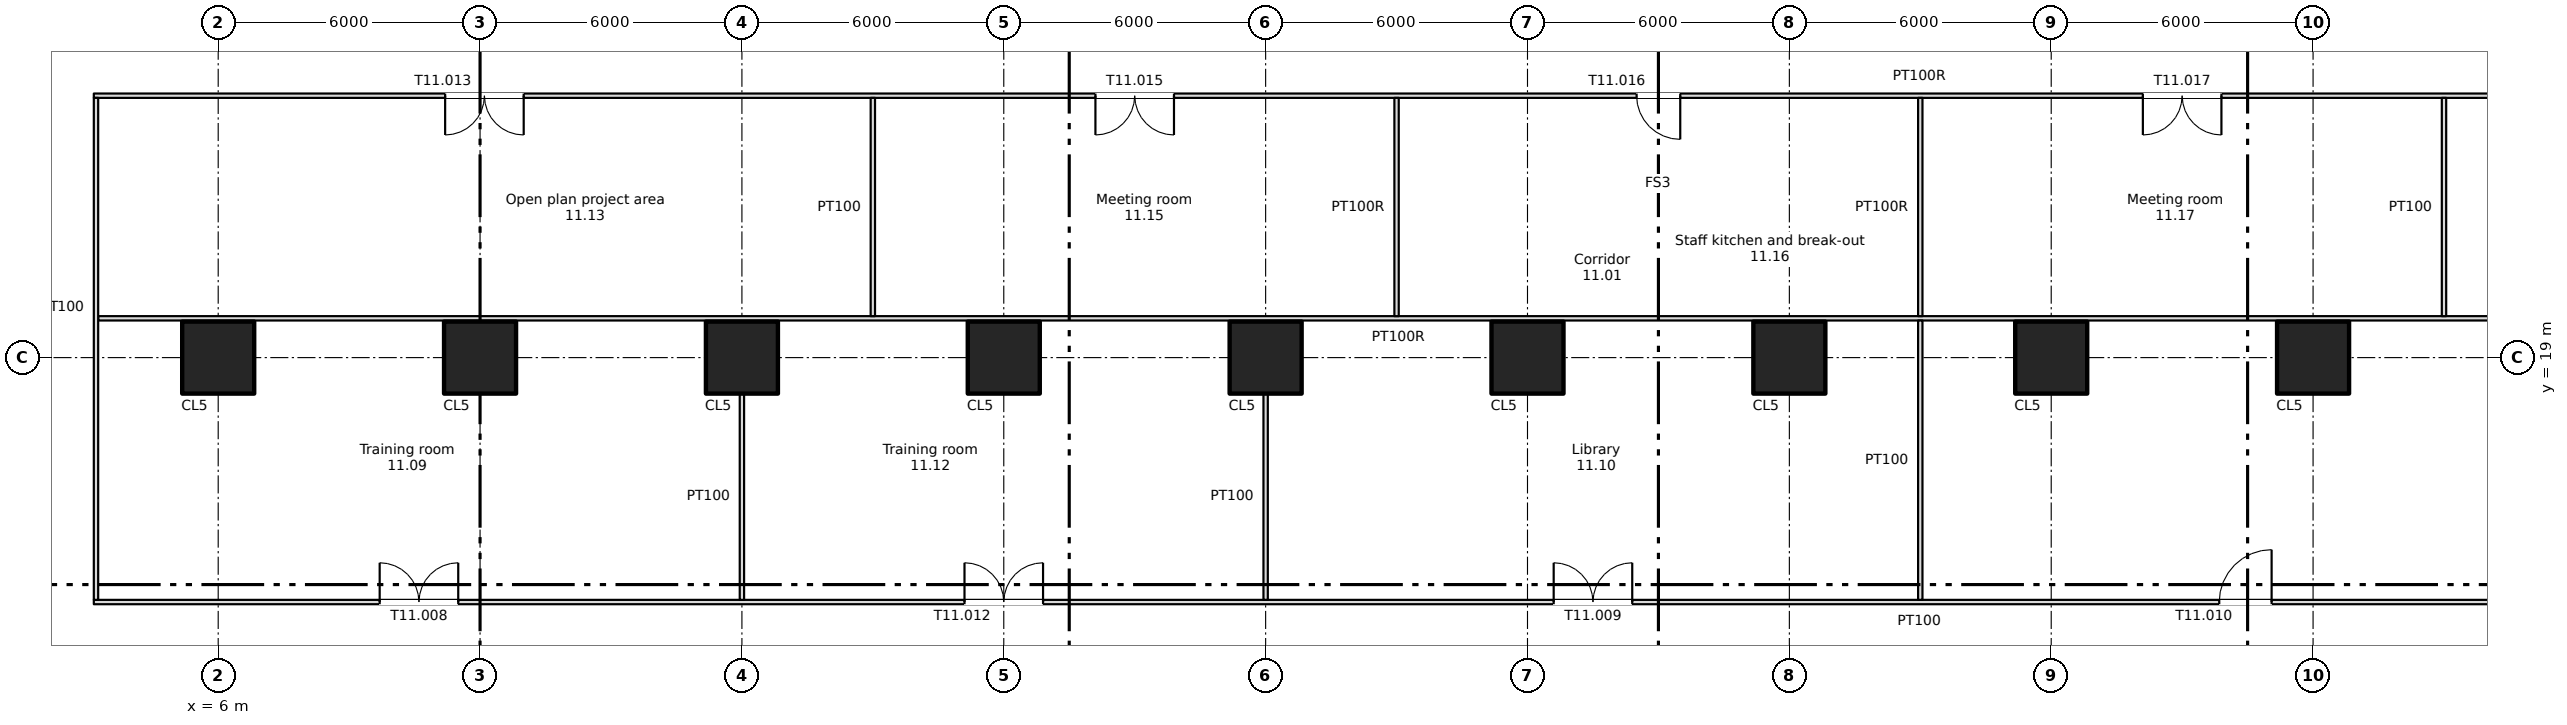
"""IFC4 building model, lengths in metres.
Left out: names, types, materials, properties, quantities, classifications, styles, units other than length and angle.
Written with IfcOpenShell. Run it as: python <this file> out.ifc"""

import sys

from ifc_helpers import new_model, si_unit, direction, frame, frame_2d, origin, origin_2d, place, context, subcontext, project, spatial, rectangle, extrude, element, fill, save


model = new_model("IFC4")
c1 = context("Model", 3, precision=1e-05, world=origin(), true_north=direction((0.0, 1.0)))
c2 = subcontext(c1, "Body", "Model", "MODEL_VIEW")
j1 = project(units=[si_unit("LENGTHUNIT", "METRE"), si_unit("PLANEANGLEUNIT", "RADIAN")], contexts=[c1])
p1 = place(None, origin())
s1 = spatial("IfcSite", under=j1, at=p1, CompositionType="ELEMENT")
p2 = place(p1, origin())
s2 = spatial("IfcBuilding", under=s1, at=p2, CompositionType="ELEMENT")
p3 = place(p2, frame((0.0, 0.0, 56.25)))
s3 = spatial("IfcBuildingStorey", under=s2, at=p3, CompositionType="ELEMENT", Elevation=56.25)
for number, where, z_axis, x_axis in (
    (1, (6.0, 19.0, 0.0), (0.0, 0.0, 1.0), (1.0, 0.0, 0.0)),
    (2, (12.0, 19.0, 0.0), (0.0, 0.0, 1.0), (1.0, 0.0, 0.0)),
    (3, (18.0, 19.0, 0.0), (0.0, 0.0, 1.0), (1.0, 0.0, 0.0)),
    (4, (24.0, 19.0, 0.0), (0.0, 0.0, 1.0), (1.0, 0.0, 0.0)),
    (5, (30.0, 19.0, 0.0), (0.0, 0.0, 1.0), (1.0, 0.0, 0.0)),
    (6, (36.0, 19.0, 0.0), (0.0, 0.0, 1.0), (1.0, 0.0, 0.0)),
    (7, (42.0, 19.0, 0.0), (0.0, 0.0, 1.0), (1.0, 0.0, 0.0)),
    (8, (48.0, 19.0, 0.0), (0.0, 0.0, 1.0), (1.0, 0.0, 0.0)),
    (9, (54.0, 19.0, 0.0), (0.0, 0.0, 1.0), (1.0, 0.0, 0.0)),
):
    element("IfcColumn", number, at=place(p3, frame(where, z_axis=z_axis, x_axis=x_axis)), inside=s3, PredefinedType="COLUMN", context=c2, shape_type="SweptSolid", body=[
        extrude(rectangle(XDim=1.65, YDim=1.65, at=origin_2d()), origin(), (0.0, 0.0, 1.0), 3.35),
    ])
p4 = place(p3, frame((3.15, 13.4, 0.0), z_axis=(0.0, 0.0, 1.0), x_axis=(1.0, 0.0, 0.0)))
e10 = element("IfcWall", 10, at=p4, inside=s3, PredefinedType="PARTITIONING", context=c2, shape_type="SweptSolid", body=[
    extrude(rectangle(XDim=71.7, YDim=0.1, at=frame_2d((35.85, 0.0))), origin(), (0.0, 0.0, 1.0), 3.35),
])
p5 = place(p4, frame((6.55, 0.0, 0.0)))
e11 = element("IfcOpeningElement", 11, at=p5, cuts=e10, PredefinedType="OPENING", context=c2, shape_type="SweptSolid", body=[
    extrude(rectangle(XDim=1.8, YDim=2.1, at=frame_2d((0.9, 1.05))), frame((0.0, 0.06, 0.0), z_axis=(0.0, -1.0, 0.0), x_axis=(1.0, 0.0, 0.0)), (0.0, 0.0, 1.0), 0.12),
])
p6 = place(p4, frame((33.45, 0.0, 0.0)))
e12 = element("IfcOpeningElement", 12, at=p6, cuts=e10, PredefinedType="OPENING", context=c2, shape_type="SweptSolid", body=[
    extrude(rectangle(XDim=1.8, YDim=2.1, at=frame_2d((0.9, 1.05))), frame((0.0, 0.06, 0.0), z_axis=(0.0, -1.0, 0.0), x_axis=(1.0, 0.0, 0.0)), (0.0, 0.0, 1.0), 0.12),
])
p7 = place(p4, frame((48.7, 0.0, 0.0)))
e13 = element("IfcOpeningElement", 13, at=p7, cuts=e10, PredefinedType="OPENING", context=c2, shape_type="SweptSolid", body=[
    extrude(rectangle(XDim=1.2, YDim=2.1, at=frame_2d((0.6, 1.05))), frame((0.0, 0.06, 0.0), z_axis=(0.0, -1.0, 0.0), x_axis=(1.0, 0.0, 0.0)), (0.0, 0.0, 1.0), 0.12),
])
p8 = place(p4, frame((63.6, 0.0, 0.0)))
e14 = element("IfcOpeningElement", 14, at=p8, cuts=e10, PredefinedType="OPENING", context=c2, shape_type="SweptSolid", body=[
    extrude(rectangle(XDim=1.2, YDim=2.1, at=frame_2d((0.6, 1.05))), frame((0.0, 0.06, 0.0), z_axis=(0.0, -1.0, 0.0), x_axis=(1.0, 0.0, 0.0)), (0.0, 0.0, 1.0), 0.12),
])
p9 = place(p4, frame((19.95, 0.0, 0.0)))
e15 = element("IfcOpeningElement", 15, at=p9, cuts=e10, PredefinedType="OPENING", context=c2, shape_type="SweptSolid", body=[
    extrude(rectangle(XDim=1.8, YDim=2.1, at=frame_2d((0.9, 1.05))), frame((0.0, 0.06, 0.0), z_axis=(0.0, -1.0, 0.0), x_axis=(1.0, 0.0, 0.0)), (0.0, 0.0, 1.0), 0.12),
])
p10 = place(p3, frame((3.25, 19.9, 0.0), z_axis=(0.0, 0.0, 1.0), x_axis=(1.0, 0.0, 0.0)))
e16 = element("IfcWall", 16, at=p10, inside=s3, PredefinedType="PARTITIONING", context=c2, shape_type="SweptSolid", body=[
    extrude(rectangle(XDim=71.5, YDim=0.1, at=frame_2d((35.75, 0.0))), origin(), (0.0, 0.0, 1.0), 3.35),
])
p11 = place(p3, frame((3.15, 25.0, 0.0), z_axis=(0.0, 0.0, 1.0), x_axis=(1.0, 0.0, 0.0)))
e17 = element("IfcWall", 17, at=p11, inside=s3, PredefinedType="PARTITIONING", context=c2, shape_type="SweptSolid", body=[
    extrude(rectangle(XDim=71.7, YDim=0.1, at=frame_2d((35.85, 0.0))), origin(), (0.0, 0.0, 1.0), 3.35),
])
p12 = place(p11, frame((8.05, 0.0, 0.0)))
e18 = element("IfcOpeningElement", 18, at=p12, cuts=e17, PredefinedType="OPENING", context=c2, shape_type="SweptSolid", body=[
    extrude(rectangle(XDim=1.8, YDim=2.1, at=frame_2d((0.9, 1.05))), frame((0.0, 0.06, 0.0), z_axis=(0.0, -1.0, 0.0), x_axis=(1.0, 0.0, 0.0)), (0.0, 0.0, 1.0), 0.12),
])
p13 = place(p11, frame((61.85, 0.0, 0.0)))
e19 = element("IfcOpeningElement", 19, at=p13, cuts=e17, PredefinedType="OPENING", context=c2, shape_type="SweptSolid", body=[
    extrude(rectangle(XDim=1.8, YDim=2.1, at=frame_2d((0.9, 1.05))), frame((0.0, 0.06, 0.0), z_axis=(0.0, -1.0, 0.0), x_axis=(1.0, 0.0, 0.0)), (0.0, 0.0, 1.0), 0.12),
])
p14 = place(p11, frame((22.95, 0.0, 0.0)))
e20 = element("IfcOpeningElement", 20, at=p14, cuts=e17, PredefinedType="OPENING", context=c2, shape_type="SweptSolid", body=[
    extrude(rectangle(XDim=1.8, YDim=2.1, at=frame_2d((0.9, 1.05))), frame((0.0, 0.06, 0.0), z_axis=(0.0, -1.0, 0.0), x_axis=(1.0, 0.0, 0.0)), (0.0, 0.0, 1.0), 0.12),
])
p15 = place(p11, frame((35.35, 0.0, 0.0)))
e21 = element("IfcOpeningElement", 21, at=p15, cuts=e17, PredefinedType="OPENING", context=c2, shape_type="SweptSolid", body=[
    extrude(rectangle(XDim=1.0, YDim=2.1, at=frame_2d((0.5, 1.05))), frame((0.0, 0.06, 0.0), z_axis=(0.0, -1.0, 0.0), x_axis=(1.0, 0.0, 0.0)), (0.0, 0.0, 1.0), 0.12),
])
p16 = place(p11, frame((46.95, 0.0, 0.0)))
e22 = element("IfcOpeningElement", 22, at=p16, cuts=e17, PredefinedType="OPENING", context=c2, shape_type="SweptSolid", body=[
    extrude(rectangle(XDim=1.8, YDim=2.1, at=frame_2d((0.9, 1.05))), frame((0.0, 0.06, 0.0), z_axis=(0.0, -1.0, 0.0), x_axis=(1.0, 0.0, 0.0)), (0.0, 0.0, 1.0), 0.12),
])
p17 = place(p3, frame((3.2, 13.45, 0.0), z_axis=(0.0, 0.0, 1.0), x_axis=(0.0, 1.0, 0.0)))
e23 = element("IfcWall", 23, at=p17, inside=s3, PredefinedType="PARTITIONING", context=c2, shape_type="SweptSolid", body=[
    extrude(rectangle(XDim=11.5, YDim=0.1, at=frame_2d((5.75, 0.0))), origin(), (0.0, 0.0, 1.0), 3.35),
])
p18 = place(p3, frame((18.0, 13.45, 0.0), z_axis=(0.0, 0.0, 1.0), x_axis=(0.0, 1.0, 0.0)))
e24 = element("IfcWall", 24, at=p18, inside=s3, PredefinedType="PARTITIONING", context=c2, shape_type="SweptSolid", body=[
    extrude(rectangle(XDim=4.725, YDim=0.1, at=frame_2d((2.363, 0.0))), origin(), (0.0, 0.0, 1.0), 3.35),
])
p19 = place(p3, frame((21.0, 19.95, 0.0), z_axis=(0.0, 0.0, 1.0), x_axis=(0.0, 1.0, 0.0)))
e25 = element("IfcWall", 25, at=p19, inside=s3, PredefinedType="PARTITIONING", context=c2, shape_type="SweptSolid", body=[
    extrude(rectangle(XDim=5.0, YDim=0.1, at=frame_2d((2.5, 0.0))), origin(), (0.0, 0.0, 1.0), 3.35),
])
p20 = place(p3, frame((30.0, 13.45, 0.0), z_axis=(0.0, 0.0, 1.0), x_axis=(0.0, 1.0, 0.0)))
e26 = element("IfcWall", 26, at=p20, inside=s3, PredefinedType="PARTITIONING", context=c2, shape_type="SweptSolid", body=[
    extrude(rectangle(XDim=4.725, YDim=0.1, at=frame_2d((2.363, 0.0))), origin(), (0.0, 0.0, 1.0), 3.35),
])
p21 = place(p3, frame((33.0, 19.95, 0.0), z_axis=(0.0, 0.0, 1.0), x_axis=(0.0, 1.0, 0.0)))
e27 = element("IfcWall", 27, at=p21, inside=s3, PredefinedType="PARTITIONING", context=c2, shape_type="SweptSolid", body=[
    extrude(rectangle(XDim=5.0, YDim=0.1, at=frame_2d((2.5, 0.0))), origin(), (0.0, 0.0, 1.0), 3.35),
])
p22 = place(p3, frame((45.0, 13.45, 0.0), z_axis=(0.0, 0.0, 1.0), x_axis=(0.0, 1.0, 0.0)))
e28 = element("IfcWall", 28, at=p22, inside=s3, PredefinedType="PARTITIONING", context=c2, shape_type="SweptSolid", body=[
    extrude(rectangle(XDim=6.4, YDim=0.1, at=frame_2d((3.2, 0.0))), origin(), (0.0, 0.0, 1.0), 3.35),
])
for number, where, z_axis, x_axis in (
    (29, (45.0, 19.95, 0.0), (0.0, 0.0, 1.0), (0.0, 1.0, 0.0)),
    (30, (57.0, 19.95, 0.0), (0.0, 0.0, 1.0), (0.0, 1.0, 0.0)),
):
    element("IfcWall", number, at=place(p3, frame(where, z_axis=z_axis, x_axis=x_axis)), inside=s3, PredefinedType="PARTITIONING", context=c2, shape_type="SweptSolid", body=[
        extrude(rectangle(XDim=5.0, YDim=0.1, at=frame_2d((2.5, 0.0))), origin(), (0.0, 0.0, 1.0), 3.35),
    ])
p23 = place(p5, origin())
e31 = element("IfcDoor", 31, at=p23, inside=s3, OperationType="DOUBLE_DOOR_SINGLE_SWING", PredefinedType="DOOR", context=c2, shape_type="SweptSolid", body=[
    extrude(rectangle(XDim=1.8, YDim=2.1, at=frame_2d((0.9, 1.05))), frame((0.0, 0.025, 0.0), z_axis=(0.0, -1.0, 0.0), x_axis=(1.0, 0.0, 0.0)), (0.0, 0.0, 1.0), 0.05),
])
fill(e11, e31)
p24 = place(p6, origin())
e32 = element("IfcDoor", 32, at=p24, inside=s3, OperationType="DOUBLE_DOOR_SINGLE_SWING", PredefinedType="DOOR", context=c2, shape_type="SweptSolid", body=[
    extrude(rectangle(XDim=1.8, YDim=2.1, at=frame_2d((0.9, 1.05))), frame((0.0, 0.025, 0.0), z_axis=(0.0, -1.0, 0.0), x_axis=(1.0, 0.0, 0.0)), (0.0, 0.0, 1.0), 0.05),
])
fill(e12, e32)
p25 = place(p7, origin())
e33 = element("IfcDoor", 33, at=p25, inside=s3, OperationType="SINGLE_SWING_RIGHT", PredefinedType="DOOR", context=c2, shape_type="SweptSolid", body=[
    extrude(rectangle(XDim=1.2, YDim=2.1, at=frame_2d((0.6, 1.05))), frame((0.0, 0.025, 0.0), z_axis=(0.0, -1.0, 0.0), x_axis=(1.0, 0.0, 0.0)), (0.0, 0.0, 1.0), 0.05),
])
fill(e13, e33)
p26 = place(p9, origin())
e34 = element("IfcDoor", 34, at=p26, inside=s3, OperationType="DOUBLE_DOOR_SINGLE_SWING", PredefinedType="DOOR", context=c2, shape_type="SweptSolid", body=[
    extrude(rectangle(XDim=1.8, YDim=2.1, at=frame_2d((0.9, 1.05))), frame((0.0, 0.025, 0.0), z_axis=(0.0, -1.0, 0.0), x_axis=(1.0, 0.0, 0.0)), (0.0, 0.0, 1.0), 0.05),
])
fill(e15, e34)
p27 = place(p12, origin())
e35 = element("IfcDoor", 35, at=p27, inside=s3, OperationType="DOUBLE_DOOR_SINGLE_SWING", PredefinedType="DOOR", context=c2, shape_type="SweptSolid", body=[
    extrude(rectangle(XDim=1.8, YDim=2.1, at=frame_2d((0.9, 1.05))), frame((0.0, 0.025, 0.0), z_axis=(0.0, -1.0, 0.0), x_axis=(1.0, 0.0, 0.0)), (0.0, 0.0, 1.0), 0.05),
])
fill(e18, e35)
p28 = place(p14, origin())
e36 = element("IfcDoor", 36, at=p28, inside=s3, OperationType="DOUBLE_DOOR_SINGLE_SWING", PredefinedType="DOOR", context=c2, shape_type="SweptSolid", body=[
    extrude(rectangle(XDim=1.8, YDim=2.1, at=frame_2d((0.9, 1.05))), frame((0.0, 0.025, 0.0), z_axis=(0.0, -1.0, 0.0), x_axis=(1.0, 0.0, 0.0)), (0.0, 0.0, 1.0), 0.05),
])
fill(e20, e36)
p29 = place(p15, origin())
e37 = element("IfcDoor", 37, at=p29, inside=s3, OperationType="SINGLE_SWING_RIGHT", PredefinedType="DOOR", context=c2, shape_type="SweptSolid", body=[
    extrude(rectangle(XDim=1.0, YDim=2.1, at=frame_2d((0.5, 1.05))), frame((0.0, 0.025, 0.0), z_axis=(0.0, -1.0, 0.0), x_axis=(1.0, 0.0, 0.0)), (0.0, 0.0, 1.0), 0.05),
])
fill(e21, e37)
p30 = place(p16, origin())
e38 = element("IfcDoor", 38, at=p30, inside=s3, OperationType="DOUBLE_DOOR_SINGLE_SWING", PredefinedType="DOOR", context=c2, shape_type="SweptSolid", body=[
    extrude(rectangle(XDim=1.8, YDim=2.1, at=frame_2d((0.9, 1.05))), frame((0.0, 0.025, 0.0), z_axis=(0.0, -1.0, 0.0), x_axis=(1.0, 0.0, 0.0)), (0.0, 0.0, 1.0), 0.05),
])
fill(e22, e38)
save(model, sys.argv[1])
